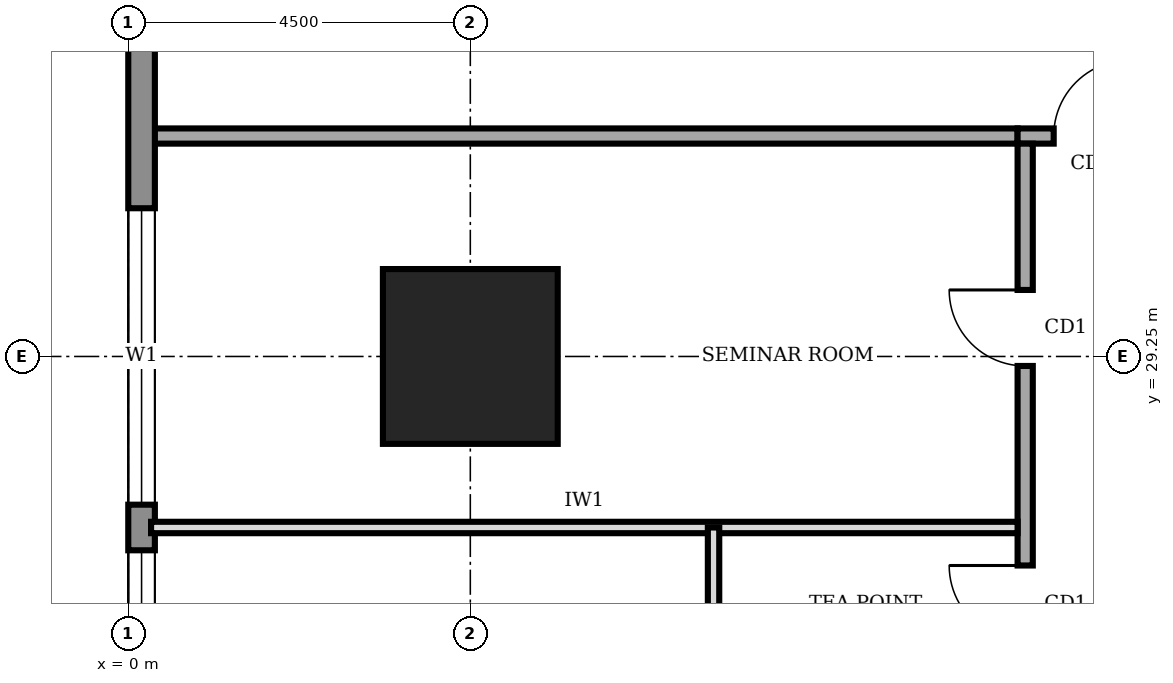
"""IFC4 building model, lengths in metres.
Left out: names, types, materials, properties, quantities, classifications, styles, units other than length and angle.
Written with IfcOpenShell. Run it as: python <this file> out.ifc"""

import sys

from ifc_helpers import new_model, si_unit, direction, frame, frame_2d, origin, origin_2d, place, context, subcontext, project, spatial, rectangle, extrude, element, fill, save


model = new_model("IFC4")
c1 = context("Model", 3, precision=1e-05, world=origin(), true_north=direction((0.0, 1.0)))
c2 = subcontext(c1, "Body", "Model", "MODEL_VIEW")
j1 = project(units=[si_unit("LENGTHUNIT", "METRE"), si_unit("PLANEANGLEUNIT", "RADIAN")], contexts=[c1])
p1 = place(None, origin())
s1 = spatial("IfcSite", under=j1, at=p1, CompositionType="ELEMENT")
p2 = place(p1, origin())
s2 = spatial("IfcBuilding", under=s1, at=p2, CompositionType="ELEMENT")
p3 = place(p2, frame((0.0, 0.0, 109.0)))
s3 = spatial("IfcBuildingStorey", under=s2, at=p3, CompositionType="ELEMENT", Elevation=109.0)
p4 = place(p3, frame((4.5, 29.25, 0.0), z_axis=(0.0, 0.0, 1.0), x_axis=(1.0, 0.0, 0.0)))
e1 = element("IfcColumn", 1, at=p4, inside=s3, PredefinedType="COLUMN", context=c2, shape_type="SweptSolid", body=[
    extrude(rectangle(XDim=2.3, YDim=2.3, at=origin_2d()), origin(), (0.0, 0.0, 1.0), 4.0),
])
p5 = place(p3, frame((0.175, 35.98, 0.0), z_axis=(0.0, 0.0, 1.0), x_axis=(0.0, -1.0, 0.0)))
e2 = element("IfcWall", 2, at=p5, inside=s3, PredefinedType="STANDARD", context=c2, shape_type="SweptSolid", body=[
    extrude(rectangle(XDim=31.46, YDim=0.35, at=frame_2d((15.73, 0.0))), origin(), (0.0, 0.0, 1.0), 3.75),
])
p6 = place(p5, frame((27.21, 0.0, 0.9)))
e3 = element("IfcOpeningElement", 3, at=p6, cuts=e2, PredefinedType="OPENING", context=c2, shape_type="SweptSolid", body=[
    extrude(rectangle(XDim=3.9, YDim=2.2, at=frame_2d((1.95, 1.1))), frame((0.0, 0.185, 0.0), z_axis=(0.0, -1.0, 0.0), x_axis=(1.0, 0.0, 0.0)), (0.0, 0.0, 1.0), 0.37),
])
p7 = place(p5, frame((22.78, 0.0, 0.9)))
e4 = element("IfcOpeningElement", 4, at=p7, cuts=e2, PredefinedType="OPENING", context=c2, shape_type="SweptSolid", body=[
    extrude(rectangle(XDim=3.9, YDim=2.2, at=frame_2d((1.95, 1.1))), frame((0.0, 0.185, 0.0), z_axis=(0.0, -1.0, 0.0), x_axis=(1.0, 0.0, 0.0)), (0.0, 0.0, 1.0), 0.37),
])
p8 = place(p5, frame((18.28, 0.0, 0.9)))
e5 = element("IfcOpeningElement", 5, at=p8, cuts=e2, PredefinedType="OPENING", context=c2, shape_type="SweptSolid", body=[
    extrude(rectangle(XDim=3.9, YDim=2.2, at=frame_2d((1.95, 1.1))), frame((0.0, 0.185, 0.0), z_axis=(0.0, -1.0, 0.0), x_axis=(1.0, 0.0, 0.0)), (0.0, 0.0, 1.0), 0.37),
])
p9 = place(p5, frame((13.78, 0.0, 0.9)))
e6 = element("IfcOpeningElement", 6, at=p9, cuts=e2, PredefinedType="OPENING", context=c2, shape_type="SweptSolid", body=[
    extrude(rectangle(XDim=3.9, YDim=2.2, at=frame_2d((1.95, 1.1))), frame((0.0, 0.185, 0.0), z_axis=(0.0, -1.0, 0.0), x_axis=(1.0, 0.0, 0.0)), (0.0, 0.0, 1.0), 0.37),
])
p10 = place(p5, frame((9.28, 0.0, 0.9)))
e7 = element("IfcOpeningElement", 7, at=p10, cuts=e2, PredefinedType="OPENING", context=c2, shape_type="SweptSolid", body=[
    extrude(rectangle(XDim=3.9, YDim=2.2, at=frame_2d((1.95, 1.1))), frame((0.0, 0.185, 0.0), z_axis=(0.0, -1.0, 0.0), x_axis=(1.0, 0.0, 0.0)), (0.0, 0.0, 1.0), 0.37),
])
p11 = place(p5, frame((4.78, 0.0, 0.9)))
e8 = element("IfcOpeningElement", 8, at=p11, cuts=e2, PredefinedType="OPENING", context=c2, shape_type="SweptSolid", body=[
    extrude(rectangle(XDim=3.9, YDim=2.2, at=frame_2d((1.95, 1.1))), frame((0.0, 0.185, 0.0), z_axis=(0.0, -1.0, 0.0), x_axis=(1.0, 0.0, 0.0)), (0.0, 0.0, 1.0), 0.37),
])
p12 = place(p3, frame((28.6, 32.15, 0.0), z_axis=(0.0, 0.0, 1.0), x_axis=(-1.0, 0.0, 0.0)))
e9 = element("IfcWall", 9, at=p12, inside=s3, PredefinedType="SOLIDWALL", context=c2, shape_type="SweptSolid", body=[
    extrude(rectangle(XDim=16.9, YDim=0.2, at=frame_2d((8.45, 0.0))), origin(), (0.0, 0.0, 1.0), 3.75),
])
p13 = place(p12, frame((15.425, 0.0, 0.0)))
e10 = element("IfcOpeningElement", 10, at=p13, cuts=e9, PredefinedType="OPENING", context=c2, shape_type="SweptSolid", body=[
    extrude(rectangle(XDim=1.0, YDim=2.1, at=frame_2d((0.5, 1.05))), frame((0.0, 0.11, 0.0), z_axis=(0.0, -1.0, 0.0), x_axis=(1.0, 0.0, 0.0)), (0.0, 0.0, 1.0), 0.22),
])
p14 = place(p12, frame((12.35, 0.0, 0.0)))
e11 = element("IfcOpeningElement", 11, at=p14, cuts=e9, PredefinedType="OPENING", context=c2, shape_type="SweptSolid", body=[
    extrude(rectangle(XDim=1.0, YDim=2.1, at=frame_2d((0.5, 1.05))), frame((0.0, 0.11, 0.0), z_axis=(0.0, -1.0, 0.0), x_axis=(1.0, 0.0, 0.0)), (0.0, 0.0, 1.0), 0.22),
])
p15 = place(p12, frame((5.6, 0.0, 0.0)))
e12 = element("IfcOpeningElement", 12, at=p15, cuts=e9, PredefinedType="OPENING", context=c2, shape_type="SweptSolid", body=[
    extrude(rectangle(XDim=1.0, YDim=2.1, at=frame_2d((0.5, 1.05))), frame((0.0, 0.11, 0.0), z_axis=(0.0, -1.0, 0.0), x_axis=(1.0, 0.0, 0.0)), (0.0, 0.0, 1.0), 0.22),
])
p16 = place(p12, frame((0.275, 0.0, 0.0)))
e13 = element("IfcOpeningElement", 13, at=p16, cuts=e9, PredefinedType="OPENING", context=c2, shape_type="SweptSolid", body=[
    extrude(rectangle(XDim=1.0, YDim=2.1, at=frame_2d((0.5, 1.05))), frame((0.0, 0.11, 0.0), z_axis=(0.0, -1.0, 0.0), x_axis=(1.0, 0.0, 0.0)), (0.0, 0.0, 1.0), 0.22),
])
p17 = place(p3, frame((11.8, 32.05, 0.0), z_axis=(0.0, 0.0, 1.0), x_axis=(0.0, -1.0, 0.0)))
e14 = element("IfcWall", 14, at=p17, inside=s3, PredefinedType="SOLIDWALL", context=c2, shape_type="SweptSolid", body=[
    extrude(rectangle(XDim=23.8, YDim=0.2, at=frame_2d((11.9, 0.0))), origin(), (0.0, 0.0, 1.0), 3.75),
])
p18 = place(p17, frame((20.675, 0.0, 0.0)))
e15 = element("IfcOpeningElement", 15, at=p18, cuts=e14, PredefinedType="OPENING", context=c2, shape_type="SweptSolid", body=[
    extrude(rectangle(XDim=1.0, YDim=2.1, at=frame_2d((0.5, 1.05))), frame((0.0, 0.11, 0.0), z_axis=(0.0, -1.0, 0.0), x_axis=(1.0, 0.0, 0.0)), (0.0, 0.0, 1.0), 0.22),
])
p19 = place(p17, frame((16.9, 0.0, 0.0)))
e16 = element("IfcOpeningElement", 16, at=p19, cuts=e14, PredefinedType="OPENING", context=c2, shape_type="SweptSolid", body=[
    extrude(rectangle(XDim=0.9, YDim=2.1, at=frame_2d((0.45, 1.05))), frame((0.0, 0.11, 0.0), z_axis=(0.0, -1.0, 0.0), x_axis=(1.0, 0.0, 0.0)), (0.0, 0.0, 1.0), 0.22),
])
p20 = place(p17, frame((13.7, 0.0, 0.0)))
e17 = element("IfcOpeningElement", 17, at=p20, cuts=e14, PredefinedType="OPENING", context=c2, shape_type="SweptSolid", body=[
    extrude(rectangle(XDim=0.9, YDim=2.1, at=frame_2d((0.45, 1.05))), frame((0.0, 0.11, 0.0), z_axis=(0.0, -1.0, 0.0), x_axis=(1.0, 0.0, 0.0)), (0.0, 0.0, 1.0), 0.22),
])
p21 = place(p17, frame((8.15, 0.0, 0.0)))
e18 = element("IfcOpeningElement", 18, at=p21, cuts=e14, PredefinedType="OPENING", context=c2, shape_type="SweptSolid", body=[
    extrude(rectangle(XDim=0.9, YDim=2.1, at=frame_2d((0.45, 1.05))), frame((0.0, 0.11, 0.0), z_axis=(0.0, -1.0, 0.0), x_axis=(1.0, 0.0, 0.0)), (0.0, 0.0, 1.0), 0.22),
])
p22 = place(p17, frame((5.55, 0.0, 0.0)))
e19 = element("IfcOpeningElement", 19, at=p22, cuts=e14, PredefinedType="OPENING", context=c2, shape_type="SweptSolid", body=[
    extrude(rectangle(XDim=1.0, YDim=2.1, at=frame_2d((0.5, 1.05))), frame((0.0, 0.11, 0.0), z_axis=(0.0, -1.0, 0.0), x_axis=(1.0, 0.0, 0.0)), (0.0, 0.0, 1.0), 0.22),
])
p23 = place(p17, frame((10.65, 0.0, 0.0)))
e20 = element("IfcOpeningElement", 20, at=p23, cuts=e14, PredefinedType="OPENING", context=c2, shape_type="SweptSolid", body=[
    extrude(rectangle(XDim=1.0, YDim=2.1, at=frame_2d((0.5, 1.05))), frame((0.0, 0.11, 0.0), z_axis=(0.0, -1.0, 0.0), x_axis=(1.0, 0.0, 0.0)), (0.0, 0.0, 1.0), 0.22),
])
p24 = place(p17, frame((1.925, 0.0, 0.0)))
e21 = element("IfcOpeningElement", 21, at=p24, cuts=e14, PredefinedType="OPENING", context=c2, shape_type="SweptSolid", body=[
    extrude(rectangle(XDim=1.0, YDim=2.1, at=frame_2d((0.5, 1.05))), frame((0.0, 0.11, 0.0), z_axis=(0.0, -1.0, 0.0), x_axis=(1.0, 0.0, 0.0)), (0.0, 0.0, 1.0), 0.22),
])
p25 = place(p3, frame((0.3, 32.15, 0.0), z_axis=(0.0, 0.0, 1.0), x_axis=(1.0, 0.0, 0.0)))
e22 = element("IfcWall", 22, at=p25, inside=s3, PredefinedType="SOLIDWALL", context=c2, shape_type="SweptSolid", body=[
    extrude(rectangle(XDim=11.4, YDim=0.2, at=frame_2d((5.7, 0.0))), origin(), (0.0, 0.0, 1.0), 3.75),
])
p26 = place(p3, frame((0.3, 27.0, 0.0), z_axis=(0.0, 0.0, 1.0), x_axis=(1.0, 0.0, 0.0)))
e23 = element("IfcWall", 23, at=p26, inside=s3, PredefinedType="PARTITIONING", context=c2, shape_type="SweptSolid", body=[
    extrude(rectangle(XDim=11.4, YDim=0.15, at=frame_2d((5.7, 0.0))), origin(), (0.0, 0.0, 1.0), 3.75),
])
p27 = place(p3, frame((7.7, 25.0, 0.0), z_axis=(0.0, 0.0, 1.0), x_axis=(0.0, 1.0, 0.0)))
e24 = element("IfcWall", 24, at=p27, inside=s3, PredefinedType="PARTITIONING", context=c2, shape_type="SweptSolid", body=[
    extrude(rectangle(XDim=2.0, YDim=0.15, at=frame_2d((1.0, 0.0))), origin(), (0.0, 0.0, 1.0), 3.75),
])
p28 = place(p10, origin())
e25 = element("IfcWindow", 25, at=p28, inside=s3, PartitioningType="SINGLE_PANEL", PredefinedType="WINDOW", context=c2, shape_type="SweptSolid", body=[
    extrude(rectangle(XDim=3.9, YDim=2.2, at=frame_2d((1.95, 1.1))), frame((0.0, 0.03, 0.0), z_axis=(0.0, -1.0, 0.0), x_axis=(1.0, 0.0, 0.0)), (0.0, 0.0, 1.0), 0.06),
])
fill(e7, e25)
p29 = place(p11, origin())
e26 = element("IfcWindow", 26, at=p29, inside=s3, PartitioningType="SINGLE_PANEL", PredefinedType="WINDOW", context=c2, shape_type="SweptSolid", body=[
    extrude(rectangle(XDim=3.9, YDim=2.2, at=frame_2d((1.95, 1.1))), frame((0.0, 0.03, 0.0), z_axis=(0.0, -1.0, 0.0), x_axis=(1.0, 0.0, 0.0)), (0.0, 0.0, 1.0), 0.06),
])
fill(e8, e26)
p30 = place(p13, frame((1.0, 0.0, 0.0), z_axis=(0.0, 0.0, 1.0), x_axis=(-1.0, 0.0, 0.0)))
e27 = element("IfcDoor", 27, at=p30, inside=s3, OperationType="SINGLE_SWING_RIGHT", PredefinedType="DOOR", context=c2, shape_type="SweptSolid", body=[
    extrude(rectangle(XDim=1.0, YDim=2.1, at=frame_2d((0.5, 1.05))), frame((0.0, 0.025, 0.0), z_axis=(0.0, -1.0, 0.0), x_axis=(1.0, 0.0, 0.0)), (0.0, 0.0, 1.0), 0.05),
])
fill(e10, e27)
p31 = place(p22, frame((1.0, 0.0, 0.0), z_axis=(0.0, 0.0, 1.0), x_axis=(-1.0, 0.0, 0.0)))
e28 = element("IfcDoor", 28, at=p31, inside=s3, OperationType="SINGLE_SWING_RIGHT", PredefinedType="DOOR", context=c2, shape_type="SweptSolid", body=[
    extrude(rectangle(XDim=1.0, YDim=2.1, at=frame_2d((0.5, 1.05))), frame((0.0, 0.025, 0.0), z_axis=(0.0, -1.0, 0.0), x_axis=(1.0, 0.0, 0.0)), (0.0, 0.0, 1.0), 0.05),
])
fill(e19, e28)
p32 = place(p24, frame((1.0, 0.0, 0.0), z_axis=(0.0, 0.0, 1.0), x_axis=(-1.0, 0.0, 0.0)))
e29 = element("IfcDoor", 29, at=p32, inside=s3, OperationType="SINGLE_SWING_RIGHT", PredefinedType="DOOR", context=c2, shape_type="SweptSolid", body=[
    extrude(rectangle(XDim=1.0, YDim=2.1, at=frame_2d((0.5, 1.05))), frame((0.0, 0.025, 0.0), z_axis=(0.0, -1.0, 0.0), x_axis=(1.0, 0.0, 0.0)), (0.0, 0.0, 1.0), 0.05),
])
fill(e21, e29)
save(model, sys.argv[1])
